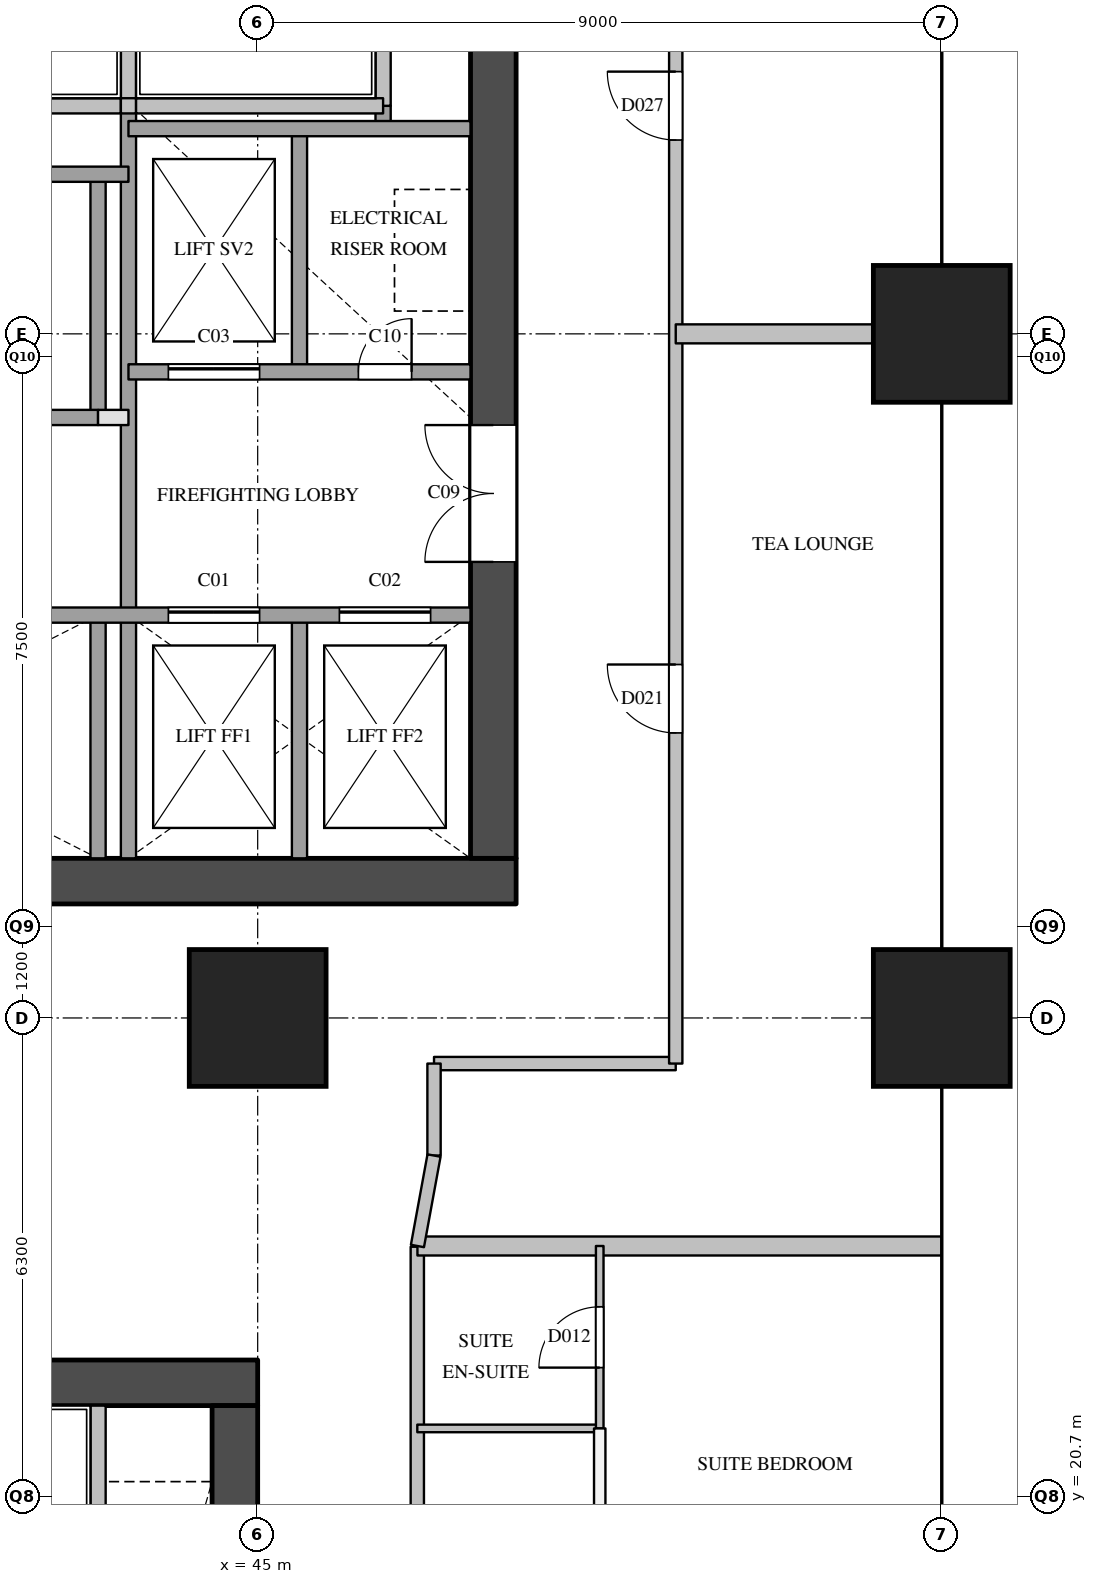
"""IFC4 building model, lengths in metres.
Left out: names, types, materials, properties, quantities, classifications, styles, units other than length and angle.
Written with IfcOpenShell. Run it as: python <this file> out.ifc"""

import sys

from ifc_helpers import new_model, si_unit, direction, frame, frame_2d, origin, origin_2d, place, context, subcontext, project, spatial, rectangle, extrude, element, fill, save


model = new_model("IFC4")
c1 = context("Model", 3, precision=1e-05, world=origin(), true_north=direction((0.0, 1.0)))
c2 = subcontext(c1, "Body", "Model", "MODEL_VIEW")
j1 = project(units=[si_unit("LENGTHUNIT", "METRE"), si_unit("PLANEANGLEUNIT", "RADIAN")], contexts=[c1])
p1 = place(None, origin())
s1 = spatial("IfcSite", under=j1, at=p1, CompositionType="ELEMENT")
p2 = place(p1, origin())
s2 = spatial("IfcBuilding", under=s1, at=p2, CompositionType="ELEMENT")
p3 = place(p2, frame((0.0, 0.0, 46.2)))
s3 = spatial("IfcBuildingStorey", under=s2, at=p3, CompositionType="ELEMENT", Elevation=46.2)
for number, where, z_axis, x_axis in (
    (1, (45.0, 27.0, 0.0), (0.0, 0.0, 1.0), (1.0, 0.0, 0.0)),
    (2, (54.0, 27.0, 0.0), (0.0, 0.0, 1.0), (1.0, 0.0, 0.0)),
    (3, (54.0, 36.0, 0.0), (0.0, 0.0, 1.0), (1.0, 0.0, 0.0)),
):
    element("IfcColumn", number, at=place(p3, frame(where, z_axis=z_axis, x_axis=x_axis)), inside=s3, PredefinedType="COLUMN", context=c2, shape_type="SweptSolid", body=[
        extrude(rectangle(XDim=1.8, YDim=1.8, at=origin_2d()), origin(), (0.0, 0.0, 1.0), 3.8),
    ])
p4 = place(p3, frame((36.0, 28.8, 0.0), z_axis=(0.0, 0.0, 1.0), x_axis=(1.0, 0.0, 0.0)))
e4 = element("IfcWall", 4, at=p4, inside=s3, PredefinedType="SHEAR", context=c2, shape_type="SweptSolid", body=[
    extrude(rectangle(XDim=12.4, YDim=0.6, at=frame_2d((6.2, 0.0))), origin(), (0.0, 0.0, 1.0), 3.5),
])
p5 = place(p3, frame((48.1, 29.1, 0.0), z_axis=(0.0, 0.0, 1.0), x_axis=(0.0, 1.0, 0.0)))
e5 = element("IfcWall", 5, at=p5, inside=s3, PredefinedType="SHEAR", context=c2, shape_type="SweptSolid", body=[
    extrude(rectangle(XDim=20.3, YDim=0.6, at=frame_2d((10.15, 0.0))), origin(), (0.0, 0.0, 1.0), 3.5),
])
p6 = place(p5, frame((12.5, 0.0, 0.0)))
e6 = element("IfcOpeningElement", 6, at=p6, cuts=e5, PredefinedType="OPENING", context=c2, shape_type="SweptSolid", body=[
    extrude(rectangle(XDim=0.7, YDim=2.1, at=frame_2d((0.35, 1.05))), frame((0.0, 0.31, 0.0), z_axis=(0.0, -1.0, 0.0), x_axis=(1.0, 0.0, 0.0)), (0.0, 0.0, 1.0), 0.62),
])
p7 = place(p5, frame((3.9, 0.0, 0.0)))
e7 = element("IfcOpeningElement", 7, at=p7, cuts=e5, PredefinedType="OPENING", context=c2, shape_type="SweptSolid", body=[
    extrude(rectangle(XDim=1.8, YDim=2.1, at=frame_2d((0.9, 1.05))), frame((0.0, 0.31, 0.0), z_axis=(0.0, -1.0, 0.0), x_axis=(1.0, 0.0, 0.0)), (0.0, 0.0, 1.0), 0.62),
])
p8 = place(p3, frame((42.9, 29.1, 0.0), z_axis=(0.0, 0.0, 1.0), x_axis=(0.0, 1.0, 0.0)))
e8 = element("IfcWall", 8, at=p8, inside=s3, PredefinedType="SOLIDWALL", context=c2, shape_type="SweptSolid", body=[
    extrude(rectangle(XDim=3.2, YDim=0.2, at=frame_2d((1.6, 0.0))), origin(), (0.0, 0.0, 1.0), 3.5),
])
p9 = place(p3, frame((42.9, 34.9, 0.0), z_axis=(0.0, 0.0, 1.0), x_axis=(0.0, 1.0, 0.0)))
e9 = element("IfcWall", 9, at=p9, inside=s3, PredefinedType="SOLIDWALL", context=c2, shape_type="SweptSolid", body=[
    extrude(rectangle(XDim=3.2, YDim=0.2, at=frame_2d((1.6, 0.0))), origin(), (0.0, 0.0, 1.0), 3.5),
])
p10 = place(p3, frame((43.3, 29.1, 0.0), z_axis=(0.0, 0.0, 1.0), x_axis=(0.0, 1.0, 0.0)))
e10 = element("IfcWall", 10, at=p10, inside=s3, PredefinedType="SOLIDWALL", context=c2, shape_type="SweptSolid", body=[
    extrude(rectangle(XDim=9.9, YDim=0.2, at=frame_2d((4.95, 0.0))), origin(), (0.0, 0.0, 1.0), 3.5),
])
p11 = place(p3, frame((43.3, 39.0, 0.0), z_axis=(0.0, 0.0, 1.0), x_axis=(0.0, 1.0, 0.0)))
e11 = element("IfcWall", 11, at=p11, inside=s3, PredefinedType="SOLIDWALL", context=c2, shape_type="SweptSolid", body=[
    extrude(rectangle(XDim=1.78, YDim=0.2, at=frame_2d((0.89, 0.0))), origin(), (0.0, 0.0, 1.0), 3.5),
])
for number, where, z_axis, x_axis in (
    (12, (45.55, 29.1, 0.0), (0.0, 0.0, 1.0), (0.0, 1.0, 0.0)),
    (13, (45.55, 35.5, 0.0), (0.0, 0.0, 1.0), (0.0, 1.0, 0.0)),
):
    element("IfcWall", number, at=place(p3, frame(where, z_axis=z_axis, x_axis=x_axis)), inside=s3, PredefinedType="SOLIDWALL", context=c2, shape_type="SweptSolid", body=[
        extrude(rectangle(XDim=3.2, YDim=0.2, at=frame_2d((1.6, 0.0))), origin(), (0.0, 0.0, 1.0), 3.5),
    ])
p12 = place(p3, frame((46.65, 38.7, 0.0), z_axis=(0.0, 0.0, 1.0), x_axis=(0.0, 1.0, 0.0)))
e14 = element("IfcWall", 14, at=p12, inside=s3, PredefinedType="SOLIDWALL", context=c2, shape_type="SweptSolid", body=[
    extrude(rectangle(XDim=0.3, YDim=0.2, at=frame_2d((0.15, 0.0))), origin(), (0.0, 0.0, 1.0), 3.5),
])
p13 = place(p3, frame((46.65, 39.0, 0.0), z_axis=(0.0, 0.0, 1.0), x_axis=(0.0, 1.0, 0.0)))
e15 = element("IfcWall", 15, at=p13, inside=s3, PredefinedType="SOLIDWALL", context=c2, shape_type="SweptSolid", body=[
    extrude(rectangle(XDim=1.78, YDim=0.2, at=frame_2d((0.89, 0.0))), origin(), (0.0, 0.0, 1.0), 3.5),
])
p14 = place(p3, frame((36.6, 32.3, 0.0), z_axis=(0.0, 0.0, 1.0), x_axis=(1.0, 0.0, 0.0)))
e16 = element("IfcWall", 16, at=p14, inside=s3, PredefinedType="SOLIDWALL", context=c2, shape_type="SweptSolid", body=[
    extrude(rectangle(XDim=11.2, YDim=0.2, at=frame_2d((5.6, 0.0))), origin(), (0.0, 0.0, 1.0), 3.5),
])
p15 = place(p14, frame((7.225, 0.0, 0.0)))
e17 = element("IfcOpeningElement", 17, at=p15, cuts=e16, PredefinedType="OPENING", context=c2, shape_type="SweptSolid", body=[
    extrude(rectangle(XDim=1.2, YDim=2.1, at=frame_2d((0.6, 1.05))), frame((0.0, 0.11, 0.0), z_axis=(0.0, -1.0, 0.0), x_axis=(1.0, 0.0, 0.0)), (0.0, 0.0, 1.0), 0.22),
])
p16 = place(p14, frame((9.475, 0.0, 0.0)))
e18 = element("IfcOpeningElement", 18, at=p16, cuts=e16, PredefinedType="OPENING", context=c2, shape_type="SweptSolid", body=[
    extrude(rectangle(XDim=1.2, YDim=2.1, at=frame_2d((0.6, 1.05))), frame((0.0, 0.11, 0.0), z_axis=(0.0, -1.0, 0.0), x_axis=(1.0, 0.0, 0.0)), (0.0, 0.0, 1.0), 0.22),
])
p17 = place(p3, frame((42.9, 34.9, 0.0), z_axis=(0.0, 0.0, 1.0), x_axis=(1.0, 0.0, 0.0)))
e19 = element("IfcWall", 19, at=p17, inside=s3, PredefinedType="PARTITIONING", context=c2, shape_type="SweptSolid", body=[
    extrude(rectangle(XDim=0.4, YDim=0.2, at=frame_2d((0.2, 0.0))), origin(), (0.0, 0.0, 1.0), 3.5),
])
p18 = place(p3, frame((36.6, 34.9, 0.0), z_axis=(0.0, 0.0, 1.0), x_axis=(1.0, 0.0, 0.0)))
e20 = element("IfcWall", 20, at=p18, inside=s3, PredefinedType="SOLIDWALL", context=c2, shape_type="SweptSolid", body=[
    extrude(rectangle(XDim=6.3, YDim=0.2, at=frame_2d((3.15, 0.0))), origin(), (0.0, 0.0, 1.0), 3.5),
])
p19 = place(p3, frame((43.3, 35.5, 0.0), z_axis=(0.0, 0.0, 1.0), x_axis=(1.0, 0.0, 0.0)))
e21 = element("IfcWall", 21, at=p19, inside=s3, PredefinedType="SOLIDWALL", context=c2, shape_type="SweptSolid", body=[
    extrude(rectangle(XDim=4.5, YDim=0.2, at=frame_2d((2.25, 0.0))), origin(), (0.0, 0.0, 1.0), 3.5),
])
p20 = place(p19, frame((0.525, 0.0, 0.0)))
e22 = element("IfcOpeningElement", 22, at=p20, cuts=e21, PredefinedType="OPENING", context=c2, shape_type="SweptSolid", body=[
    extrude(rectangle(XDim=1.2, YDim=2.1, at=frame_2d((0.6, 1.05))), frame((0.0, 0.11, 0.0), z_axis=(0.0, -1.0, 0.0), x_axis=(1.0, 0.0, 0.0)), (0.0, 0.0, 1.0), 0.22),
])
p21 = place(p19, frame((3.025, 0.0, 0.0)))
e23 = element("IfcOpeningElement", 23, at=p21, cuts=e21, PredefinedType="OPENING", context=c2, shape_type="SweptSolid", body=[
    extrude(rectangle(XDim=0.7, YDim=2.1, at=frame_2d((0.35, 1.05))), frame((0.0, 0.11, 0.0), z_axis=(0.0, -1.0, 0.0), x_axis=(1.0, 0.0, 0.0)), (0.0, 0.0, 1.0), 0.22),
])
p22 = place(p3, frame((36.6, 38.1, 0.0), z_axis=(0.0, 0.0, 1.0), x_axis=(1.0, 0.0, 0.0)))
e24 = element("IfcWall", 24, at=p22, inside=s3, PredefinedType="SOLIDWALL", context=c2, shape_type="SweptSolid", body=[
    extrude(rectangle(XDim=6.7, YDim=0.2, at=frame_2d((3.35, 0.0))), origin(), (0.0, 0.0, 1.0), 3.5),
])
p23 = place(p3, frame((43.3, 38.7, 0.0), z_axis=(0.0, 0.0, 1.0), x_axis=(1.0, 0.0, 0.0)))
e25 = element("IfcWall", 25, at=p23, inside=s3, PredefinedType="SOLIDWALL", context=c2, shape_type="SweptSolid", body=[
    extrude(rectangle(XDim=4.5, YDim=0.2, at=frame_2d((2.25, 0.0))), origin(), (0.0, 0.0, 1.0), 3.5),
])
p24 = place(p3, frame((40.05, 39.0, 0.0), z_axis=(0.0, 0.0, 1.0), x_axis=(1.0, 0.0, 0.0)))
e26 = element("IfcWall", 26, at=p24, inside=s3, PredefinedType="SOLIDWALL", context=c2, shape_type="SweptSolid", body=[
    extrude(rectangle(XDim=3.15, YDim=0.2, at=frame_2d((1.575, 0.0))), origin(), (0.0, 0.0, 1.0), 3.5),
])
p25 = place(p3, frame((43.2, 39.0, 0.0), z_axis=(0.0, 0.0, 1.0), x_axis=(1.0, 0.0, 0.0)))
e27 = element("IfcWall", 27, at=p25, inside=s3, PredefinedType="SOLIDWALL", context=c2, shape_type="SweptSolid", body=[
    extrude(rectangle(XDim=0.2, YDim=0.2, at=frame_2d((0.1, 0.0))), origin(), (0.0, 0.0, 1.0), 3.5),
])
p26 = place(p3, frame((43.4, 39.0, 0.0), z_axis=(0.0, 0.0, 1.0), x_axis=(1.0, 0.0, 0.0)))
e28 = element("IfcWall", 28, at=p26, inside=s3, PredefinedType="SOLIDWALL", context=c2, shape_type="SweptSolid", body=[
    extrude(rectangle(XDim=3.25, YDim=0.2, at=frame_2d((1.625, 0.0))), origin(), (0.0, 0.0, 1.0), 3.5),
])
p27 = place(p3, frame((36.0, 22.2, 0.0), z_axis=(0.0, 0.0, 1.0), x_axis=(1.0, 0.0, 0.0)))
e29 = element("IfcWall", 29, at=p27, inside=s3, PredefinedType="SHEAR", context=c2, shape_type="SweptSolid", body=[
    extrude(rectangle(XDim=9.0, YDim=0.6, at=frame_2d((4.5, 0.0))), origin(), (0.0, 0.0, 1.0), 3.5),
])
p28 = place(p3, frame((44.7, 9.6, 0.0), z_axis=(0.0, 0.0, 1.0), x_axis=(0.0, 1.0, 0.0)))
e30 = element("IfcWall", 30, at=p28, inside=s3, PredefinedType="SHEAR", context=c2, shape_type="SweptSolid", body=[
    extrude(rectangle(XDim=12.3, YDim=0.6, at=frame_2d((6.15, 0.0))), origin(), (0.0, 0.0, 1.0), 3.5),
])
p29 = place(p28, frame((0.8, 0.0, 0.0)))
e31 = element("IfcOpeningElement", 31, at=p29, cuts=e30, PredefinedType="OPENING", context=c2, shape_type="SweptSolid", body=[
    extrude(rectangle(XDim=0.7, YDim=2.1, at=frame_2d((0.35, 1.05))), frame((0.0, 0.31, 0.0), z_axis=(0.0, -1.0, 0.0), x_axis=(1.0, 0.0, 0.0)), (0.0, 0.0, 1.0), 0.62),
])
p30 = place(p3, frame((42.9, 20.0, 0.0), z_axis=(0.0, 0.0, 1.0), x_axis=(0.0, 1.0, 0.0)))
e32 = element("IfcWall", 32, at=p30, inside=s3, PredefinedType="SOLIDWALL", context=c2, shape_type="SweptSolid", body=[
    extrude(rectangle(XDim=1.9, YDim=0.2, at=frame_2d((0.95, 0.0))), origin(), (0.0, 0.0, 1.0), 3.5),
])
p31 = place(p3, frame((47.32, 26.4, 0.0), z_axis=(0.0, 0.0, 1.0), x_axis=(1.0, 0.0, 0.0)))
e33 = element("IfcWall", 33, at=p31, inside=s3, PredefinedType="PARTITIONING", context=c2, shape_type="SweptSolid", body=[
    extrude(rectangle(XDim=3.18, YDim=0.175, at=frame_2d((1.59, 0.0))), origin(), (0.0, 0.0, 1.0), 3.5),
])
p32 = place(p3, frame((47.1, 6.9, 0.0), z_axis=(0.0, 0.0, 1.0), x_axis=(0.0, 1.0, 0.0)))
e34 = element("IfcWall", 34, at=p32, inside=s3, PredefinedType="PARTITIONING", context=c2, shape_type="SweptSolid", body=[
    extrude(rectangle(XDim=17.09, YDim=0.175, at=frame_2d((8.545, 0.0))), origin(), (0.0, 0.0, 1.0), 3.5),
])
p33 = place(p32, frame((9.4, 0.0, 0.0)))
e35 = element("IfcOpeningElement", 35, at=p33, cuts=e34, PredefinedType="OPENING", context=c2, shape_type="SweptSolid", body=[
    extrude(rectangle(XDim=1.0, YDim=2.1, at=frame_2d((0.5, 1.05))), frame((0.0, 0.097, 0.0), z_axis=(0.0, -1.0, 0.0), x_axis=(1.0, 0.0, 0.0)), (0.0, 0.0, 1.0), 0.195),
])
p34 = place(p3, frame((47.32, 25.19, 0.0), z_axis=(0.0, 0.0, 1.0), x_axis=(0.0, 1.0, 0.0)))
e36 = element("IfcWall", 36, at=p34, inside=s3, PredefinedType="PARTITIONING", context=c2, shape_type="SweptSolid", body=[
    extrude(rectangle(XDim=1.21, YDim=0.175, at=frame_2d((0.605, 0.0))), origin(), (0.0, 0.0, 1.0), 3.5),
])
p35 = place(p3, frame((50.5, 26.4, 0.0), z_axis=(0.0, 0.0, 1.0), x_axis=(0.0, 1.0, 0.0)))
e37 = element("IfcWall", 37, at=p35, inside=s3, PredefinedType="PARTITIONING", context=c2, shape_type="SweptSolid", body=[
    extrude(rectangle(XDim=25.7, YDim=0.175, at=frame_2d((12.85, 0.0))), origin(), (0.0, 0.0, 1.0), 2.5),
])
p36 = place(p35, frame((4.35, 0.0, 0.0)))
e38 = element("IfcOpeningElement", 38, at=p36, cuts=e37, PredefinedType="OPENING", context=c2, shape_type="SweptSolid", body=[
    extrude(rectangle(XDim=0.9, YDim=2.1, at=frame_2d((0.45, 1.05))), frame((0.0, 0.097, 0.0), z_axis=(0.0, -1.0, 0.0), x_axis=(1.0, 0.0, 0.0)), (0.0, 0.0, 1.0), 0.195),
])
p37 = place(p35, frame((12.15, 0.0, 0.0)))
e39 = element("IfcOpeningElement", 39, at=p37, cuts=e37, PredefinedType="OPENING", context=c2, shape_type="SweptSolid", body=[
    extrude(rectangle(XDim=0.9, YDim=2.1, at=frame_2d((0.45, 1.05))), frame((0.0, 0.097, 0.0), z_axis=(0.0, -1.0, 0.0), x_axis=(1.0, 0.0, 0.0)), (0.0, 0.0, 1.0), 0.195),
])
p38 = place(p35, frame((20.2, 0.0, 0.0)))
e40 = element("IfcOpeningElement", 40, at=p38, cuts=e37, PredefinedType="OPENING", context=c2, shape_type="SweptSolid", body=[
    extrude(rectangle(XDim=0.9, YDim=2.1, at=frame_2d((0.45, 1.05))), frame((0.0, 0.097, 0.0), z_axis=(0.0, -1.0, 0.0), x_axis=(1.0, 0.0, 0.0)), (0.0, 0.0, 1.0), 0.195),
])
p39 = place(p3, frame((49.5, 12.0, 0.0), z_axis=(0.0, 0.0, 1.0), x_axis=(0.0, 1.0, 0.0)))
e41 = element("IfcWall", 41, at=p39, inside=s3, PredefinedType="PARTITIONING", context=c2, shape_type="SweptSolid", body=[
    extrude(rectangle(XDim=9.6, YDim=0.15, at=frame_2d((4.8, 0.0))), origin(), (0.0, 0.0, 1.0), 3.5),
])
p40 = place(p39, frame((4.35, 0.0, 0.0)))
e42 = element("IfcOpeningElement", 42, at=p40, cuts=e41, PredefinedType="OPENING", context=c2, shape_type="SweptSolid", body=[
    extrude(rectangle(XDim=0.9, YDim=2.1, at=frame_2d((0.45, 1.05))), frame((0.0, 0.085, 0.0), z_axis=(0.0, -1.0, 0.0), x_axis=(1.0, 0.0, 0.0)), (0.0, 0.0, 1.0), 0.17),
])
p41 = place(p3, frame((47.102, 24.0, 0.0), z_axis=(0.0, 0.0, 1.0), x_axis=(1.0, 0.0, 0.0)))
e43 = element("IfcWall", 43, at=p41, inside=s3, PredefinedType="PARTITIONING", context=c2, shape_type="SweptSolid", body=[
    extrude(rectangle(XDim=6.898, YDim=0.25, at=frame_2d((3.449, 0.0))), origin(), (0.0, 0.0, 1.0), 2.5),
])
p42 = place(p3, frame((50.5, 36.0, 0.0), z_axis=(0.0, 0.0, 1.0), x_axis=(1.0, 0.0, 0.0)))
e44 = element("IfcWall", 44, at=p42, inside=s3, PredefinedType="PARTITIONING", context=c2, shape_type="SweptSolid", body=[
    extrude(rectangle(XDim=3.5, YDim=0.25, at=frame_2d((1.75, 0.0))), origin(), (0.0, 0.0, 1.0), 3.5),
])
p43 = place(p3, frame((47.1, 21.6, 0.0), z_axis=(0.0, 0.0, 1.0), x_axis=(1.0, 0.0, 0.0)))
e45 = element("IfcWall", 45, at=p43, inside=s3, PredefinedType="PARTITIONING", context=c2, shape_type="SweptSolid", body=[
    extrude(rectangle(XDim=2.4, YDim=0.1, at=frame_2d((1.2, 0.0))), origin(), (0.0, 0.0, 1.0), 3.5),
])
p44 = place(p3, frame((49.5, 21.6, 0.0), z_axis=(0.0, 0.0, 1.0), x_axis=(0.0, 1.0, 0.0)))
e46 = element("IfcWall", 46, at=p44, inside=s3, PredefinedType="PARTITIONING", context=c2, shape_type="SweptSolid", body=[
    extrude(rectangle(XDim=2.4, YDim=0.1, at=frame_2d((1.2, 0.0))), origin(), (0.0, 0.0, 1.0), 3.5),
])
p45 = place(p44, frame((0.8, 0.0, 0.0)))
e47 = element("IfcOpeningElement", 47, at=p45, cuts=e46, PredefinedType="OPENING", context=c2, shape_type="SweptSolid", body=[
    extrude(rectangle(XDim=0.8, YDim=2.1, at=frame_2d((0.4, 1.05))), frame((0.0, 0.06, 0.0), z_axis=(0.0, -1.0, 0.0), x_axis=(1.0, 0.0, 0.0)), (0.0, 0.0, 1.0), 0.12),
])
p46 = place(p3, frame((47.32, 25.19, 0.0), z_axis=(0.0, 0.0, 1.0), x_axis=(-0.180412472784, -0.983591042895, 0.0)))
e48 = element("IfcWall", 48, at=p46, inside=s3, PredefinedType="PARTITIONING", context=c2, shape_type="SweptSolid", body=[
    extrude(rectangle(XDim=1.21, YDim=0.175, at=frame_2d((0.605, 0.0))), origin(), (0.0, 0.0, 1.0), 3.5),
])
p47 = place(p15, origin())
e49 = element("IfcDoor", 49, at=p47, inside=s3, OperationType="SLIDING_TO_LEFT", PredefinedType="DOOR", context=c2, shape_type="SweptSolid", body=[
    extrude(rectangle(XDim=1.2, YDim=2.1, at=frame_2d((0.6, 1.05))), frame((0.0, 0.025, 0.0), z_axis=(0.0, -1.0, 0.0), x_axis=(1.0, 0.0, 0.0)), (0.0, 0.0, 1.0), 0.05),
])
fill(e17, e49)
p48 = place(p16, origin())
e50 = element("IfcDoor", 50, at=p48, inside=s3, OperationType="SLIDING_TO_LEFT", PredefinedType="DOOR", context=c2, shape_type="SweptSolid", body=[
    extrude(rectangle(XDim=1.2, YDim=2.1, at=frame_2d((0.6, 1.05))), frame((0.0, 0.025, 0.0), z_axis=(0.0, -1.0, 0.0), x_axis=(1.0, 0.0, 0.0)), (0.0, 0.0, 1.0), 0.05),
])
fill(e18, e50)
p49 = place(p20, origin())
e51 = element("IfcDoor", 51, at=p49, inside=s3, OperationType="SLIDING_TO_LEFT", PredefinedType="DOOR", context=c2, shape_type="SweptSolid", body=[
    extrude(rectangle(XDim=1.2, YDim=2.1, at=frame_2d((0.6, 1.05))), frame((0.0, 0.025, 0.0), z_axis=(0.0, -1.0, 0.0), x_axis=(1.0, 0.0, 0.0)), (0.0, 0.0, 1.0), 0.05),
])
fill(e22, e51)
p50 = place(p7, origin())
e52 = element("IfcDoor", 52, at=p50, inside=s3, OperationType="DOUBLE_DOOR_SINGLE_SWING", PredefinedType="DOOR", context=c2, shape_type="SweptSolid", body=[
    extrude(rectangle(XDim=1.8, YDim=2.1, at=frame_2d((0.9, 1.05))), frame((0.0, 0.025, 0.0), z_axis=(0.0, -1.0, 0.0), x_axis=(1.0, 0.0, 0.0)), (0.0, 0.0, 1.0), 0.05),
])
fill(e7, e52)
p51 = place(p21, origin())
e53 = element("IfcDoor", 53, at=p51, inside=s3, OperationType="SINGLE_SWING_RIGHT", PredefinedType="DOOR", context=c2, shape_type="SweptSolid", body=[
    extrude(rectangle(XDim=0.7, YDim=2.1, at=frame_2d((0.35, 1.05))), frame((0.0, 0.025, 0.0), z_axis=(0.0, -1.0, 0.0), x_axis=(1.0, 0.0, 0.0)), (0.0, 0.0, 1.0), 0.05),
])
fill(e23, e53)
p52 = place(p45, origin())
e54 = element("IfcDoor", 54, at=p52, inside=s3, OperationType="SINGLE_SWING_LEFT", PredefinedType="DOOR", context=c2, shape_type="SweptSolid", body=[
    extrude(rectangle(XDim=0.8, YDim=2.1, at=frame_2d((0.4, 1.05))), frame((0.0, 0.025, 0.0), z_axis=(0.0, -1.0, 0.0), x_axis=(1.0, 0.0, 0.0)), (0.0, 0.0, 1.0), 0.05),
])
fill(e47, e54)
p53 = place(p36, origin())
e55 = element("IfcDoor", 55, at=p53, inside=s3, OperationType="SINGLE_SWING_RIGHT", PredefinedType="DOOR", context=c2, shape_type="SweptSolid", body=[
    extrude(rectangle(XDim=0.9, YDim=2.1, at=frame_2d((0.45, 1.05))), frame((0.0, 0.025, 0.0), z_axis=(0.0, -1.0, 0.0), x_axis=(1.0, 0.0, 0.0)), (0.0, 0.0, 1.0), 0.05),
])
fill(e38, e55)
p54 = place(p37, origin())
e56 = element("IfcDoor", 56, at=p54, inside=s3, OperationType="SINGLE_SWING_RIGHT", PredefinedType="DOOR", context=c2, shape_type="SweptSolid", body=[
    extrude(rectangle(XDim=0.9, YDim=2.1, at=frame_2d((0.45, 1.05))), frame((0.0, 0.025, 0.0), z_axis=(0.0, -1.0, 0.0), x_axis=(1.0, 0.0, 0.0)), (0.0, 0.0, 1.0), 0.05),
])
fill(e39, e56)
save(model, sys.argv[1])
